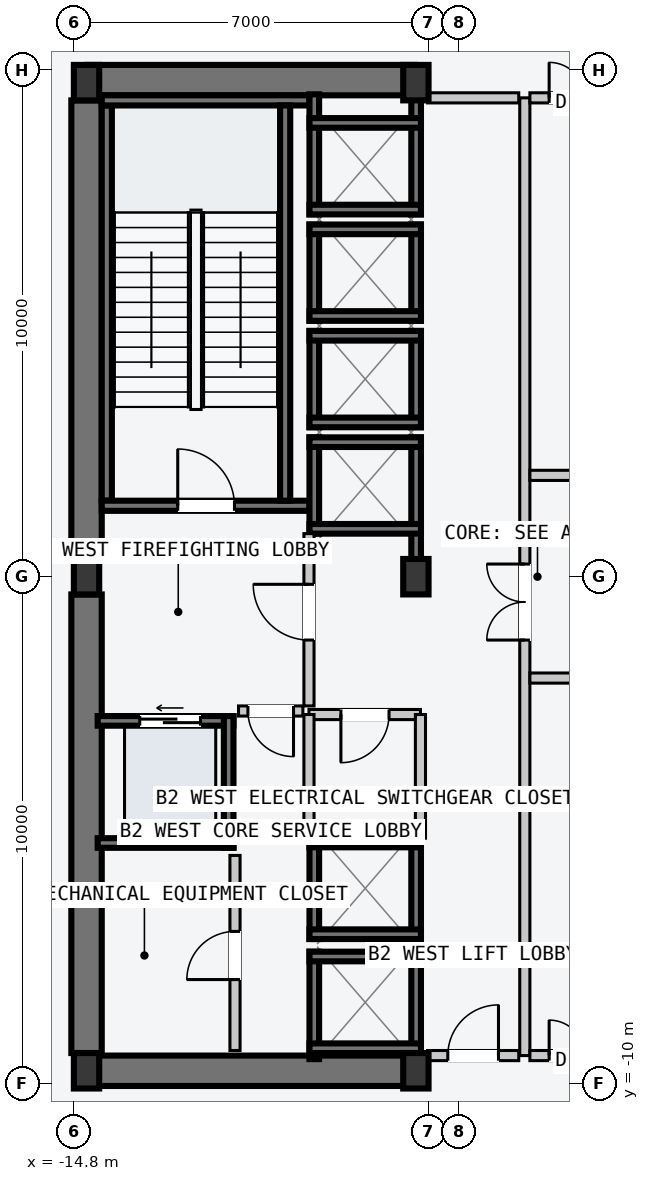
"""IFC4 building model, lengths in metres.
Left out: names, types, materials, properties, quantities, classifications, styles, units other than length and angle.
Written with IfcOpenShell. Run it as: python <this file> out.ifc"""

import sys

from ifc_helpers import new_model, si_unit, direction, frame, frame_2d, origin, origin_2d, place, context, subcontext, project, spatial, rectangle, i_section, extrude, element, fill, save


model = new_model("IFC4")
c1 = context("Model", 3, precision=1e-05, world=origin(), true_north=direction((0.0, 1.0)))
c2 = subcontext(c1, "Body", "Model", "MODEL_VIEW")
j1 = project(units=[si_unit("LENGTHUNIT", "METRE"), si_unit("PLANEANGLEUNIT", "RADIAN")], contexts=[c1])
p1 = place(None, origin())
s1 = spatial("IfcSite", under=j1, at=p1, CompositionType="ELEMENT")
p2 = place(p1, origin())
s2 = spatial("IfcBuilding", under=s1, at=p2, CompositionType="ELEMENT")
p3 = place(p2, frame((0.0, 0.0, -9.6)))
s3 = spatial("IfcBuildingStorey", under=s2, at=p3, CompositionType="ELEMENT", Elevation=-9.6)
for number, where, z_axis, x_axis in (
    (1, (-14.53, -9.75, 0.0), (0.0, 0.0, 1.0), (1.0, 0.0, 0.0)),
    (2, (-14.53, 9.8, 0.0), (0.0, 0.0, 1.0), (1.0, 0.0, 0.0)),
):
    element("IfcWall", number, at=place(p3, frame(where, z_axis=z_axis, x_axis=x_axis)), inside=s3, PredefinedType="SHEAR", context=c2, shape_type="SweptSolid", body=[
        extrude(rectangle(XDim=6.46, YDim=0.6, at=frame_2d((3.23, 0.0))), origin(), (0.0, 0.0, 1.0), 4.58),
    ])
for number, where, z_axis, x_axis in (
    (3, (-14.55, -9.4, 0.0), (0.0, 0.0, 1.0), (0.0, 1.0, 0.0)),
    (4, (-14.55, 0.35, 0.0), (0.0, 0.0, 1.0), (0.0, 1.0, 0.0)),
):
    element("IfcWall", number, at=place(p3, frame(where, z_axis=z_axis, x_axis=x_axis)), inside=s3, PredefinedType="SHEAR", context=c2, shape_type="SweptSolid", body=[
        extrude(rectangle(XDim=9.05, YDim=0.6, at=frame_2d((4.525, 0.0))), origin(), (0.0, 0.0, 1.0), 4.58),
    ])
p4 = place(p3, frame((-14.15, 1.5, 0.0), z_axis=(0.0, 0.0, 1.0), x_axis=(0.0, 1.0, 0.0)))
e5 = element("IfcWall", 5, at=p4, inside=s3, PredefinedType="SOLIDWALL", context=c2, shape_type="SweptSolid", body=[
    extrude(rectangle(XDim=7.8, YDim=0.2, at=frame_2d((3.9, 0.0))), origin(), (0.0, 0.0, 1.0), 4.58),
])
p5 = place(p3, frame((-14.25, 1.4, 0.0), z_axis=(0.0, 0.0, 1.0), x_axis=(1.0, 0.0, 0.0)))
e6 = element("IfcWall", 6, at=p5, inside=s3, PredefinedType="SOLIDWALL", context=c2, shape_type="SweptSolid", body=[
    extrude(rectangle(XDim=4.1, YDim=0.2, at=frame_2d((2.05, 0.0))), origin(), (0.0, 0.0, 1.0), 4.58),
])
p6 = place(p5, frame((1.5, 0.0, 0.0)))
e7 = element("IfcOpeningElement", 7, at=p6, cuts=e6, PredefinedType="OPENING", context=c2, shape_type="SweptSolid", body=[
    extrude(rectangle(XDim=1.12, YDim=2.18, at=frame_2d((0.56, 1.09))), frame((0.0, 0.11, 0.0), z_axis=(0.0, -1.0, 0.0), x_axis=(1.0, 0.0, 0.0)), (0.0, 0.0, 1.0), 0.22),
])
p7 = place(p3, frame((-14.25, 9.4, 0.0), z_axis=(0.0, 0.0, 1.0), x_axis=(1.0, 0.0, 0.0)))
e8 = element("IfcWall", 8, at=p7, inside=s3, PredefinedType="SOLIDWALL", context=c2, shape_type="SweptSolid", body=[
    extrude(rectangle(XDim=4.1, YDim=0.2, at=frame_2d((2.05, 0.0))), origin(), (0.0, 0.0, 1.0), 4.58),
])
p8 = place(p3, frame((-10.63, 1.5, 0.0), z_axis=(0.0, 0.0, 1.0), x_axis=(0.0, 1.0, 0.0)))
e9 = element("IfcWall", 9, at=p8, inside=s3, PredefinedType="SOLIDWALL", context=c2, shape_type="SweptSolid", body=[
    extrude(rectangle(XDim=7.8, YDim=0.2, at=frame_2d((3.9, 0.0))), origin(), (0.0, 0.0, 1.0), 4.58),
])
for number, where, z_axis, x_axis in (
    (10, (-14.55, -9.75, 0.0), (0.0, 0.0, 1.0), (1.0, 0.0, 0.0)),
    (11, (-14.55, 0.0, 0.0), (0.0, 0.0, 1.0), (1.0, 0.0, 0.0)),
    (12, (-14.55, 9.75, 0.0), (0.0, 0.0, 1.0), (1.0, 0.0, 0.0)),
    (13, (-8.05, -9.75, 0.0), (0.0, 0.0, 1.0), (1.0, 0.0, 0.0)),
    (14, (-8.05, 0.0, 0.0), (0.0, 0.0, 1.0), (1.0, 0.0, 0.0)),
    (15, (-8.05, 9.75, 0.0), (0.0, 0.0, 1.0), (1.0, 0.0, 0.0)),
):
    element("IfcColumn", number, at=place(p3, frame(where, z_axis=z_axis, x_axis=x_axis)), inside=s3, PredefinedType="COLUMN", context=c2, shape_type="SweptSolid", body=[
        extrude(i_section(OverallWidth=0.5, OverallDepth=0.7, WebThickness=0.028, FlangeThickness=0.045, at=origin_2d()), origin(), (0.0, 0.0, 1.0), 4.8),
    ])
p9 = place(p3, frame((-8.045, 0.21, 0.0), z_axis=(0.0, 0.0, 1.0), x_axis=(0.0, 1.0, 0.0)))
e16 = element("IfcWall", 16, at=p9, inside=s3, PredefinedType="SOLIDWALL", context=c2, shape_type="SweptSolid", body=[
    extrude(rectangle(XDim=2.54, YDim=0.19, at=frame_2d((1.27, 0.0))), origin(), (0.0, 0.0, 1.0), 4.58),
])
p10 = place(p3, frame((-10.055, 0.85, 0.0), z_axis=(0.0, 0.0, 1.0), x_axis=(0.0, 1.0, 0.0)))
e17 = element("IfcWall", 17, at=p10, inside=s3, PredefinedType="SOLIDWALL", context=c2, shape_type="SweptSolid", body=[
    extrude(rectangle(XDim=1.9, YDim=0.19, at=frame_2d((0.95, 0.0))), origin(), (0.0, 0.0, 1.0), 4.58),
])
for number, where, z_axis, x_axis in (
    (18, (-10.15, 2.655, 0.0), (0.0, 0.0, 1.0), (1.0, 0.0, 0.0)),
    (19, (-10.15, 0.945, 0.0), (0.0, 0.0, 1.0), (1.0, 0.0, 0.0)),
):
    element("IfcWall", number, at=place(p3, frame(where, z_axis=z_axis, x_axis=x_axis)), inside=s3, PredefinedType="SOLIDWALL", context=c2, shape_type="SweptSolid", body=[
        extrude(rectangle(XDim=2.2, YDim=0.19, at=frame_2d((1.1, 0.0))), origin(), (0.0, 0.0, 1.0), 4.58),
    ])
for number, where, z_axis, x_axis in (
    (20, (-8.045, 2.95, 0.0), (0.0, 0.0, 1.0), (0.0, 1.0, 0.0)),
    (21, (-10.055, 2.95, 0.0), (0.0, 0.0, 1.0), (0.0, 1.0, 0.0)),
):
    element("IfcWall", number, at=place(p3, frame(where, z_axis=z_axis, x_axis=x_axis)), inside=s3, PredefinedType="SOLIDWALL", context=c2, shape_type="SweptSolid", body=[
        extrude(rectangle(XDim=1.9, YDim=0.19, at=frame_2d((0.95, 0.0))), origin(), (0.0, 0.0, 1.0), 4.58),
    ])
for number, where, z_axis, x_axis in (
    (22, (-10.15, 4.755, 0.0), (0.0, 0.0, 1.0), (1.0, 0.0, 0.0)),
    (23, (-10.15, 3.045, 0.0), (0.0, 0.0, 1.0), (1.0, 0.0, 0.0)),
):
    element("IfcWall", number, at=place(p3, frame(where, z_axis=z_axis, x_axis=x_axis)), inside=s3, PredefinedType="SOLIDWALL", context=c2, shape_type="SweptSolid", body=[
        extrude(rectangle(XDim=2.2, YDim=0.19, at=frame_2d((1.1, 0.0))), origin(), (0.0, 0.0, 1.0), 4.58),
    ])
for number, where, z_axis, x_axis in (
    (24, (-8.045, 5.05, 0.0), (0.0, 0.0, 1.0), (0.0, 1.0, 0.0)),
    (25, (-10.055, 5.05, 0.0), (0.0, 0.0, 1.0), (0.0, 1.0, 0.0)),
):
    element("IfcWall", number, at=place(p3, frame(where, z_axis=z_axis, x_axis=x_axis)), inside=s3, PredefinedType="SOLIDWALL", context=c2, shape_type="SweptSolid", body=[
        extrude(rectangle(XDim=1.9, YDim=0.19, at=frame_2d((0.95, 0.0))), origin(), (0.0, 0.0, 1.0), 4.58),
    ])
for number, where, z_axis, x_axis in (
    (26, (-10.15, 6.855, 0.0), (0.0, 0.0, 1.0), (1.0, 0.0, 0.0)),
    (27, (-10.15, 5.145, 0.0), (0.0, 0.0, 1.0), (1.0, 0.0, 0.0)),
):
    element("IfcWall", number, at=place(p3, frame(where, z_axis=z_axis, x_axis=x_axis)), inside=s3, PredefinedType="SOLIDWALL", context=c2, shape_type="SweptSolid", body=[
        extrude(rectangle(XDim=2.2, YDim=0.19, at=frame_2d((1.1, 0.0))), origin(), (0.0, 0.0, 1.0), 4.58),
    ])
for number, where, z_axis, x_axis in (
    (28, (-8.045, 7.15, 0.0), (0.0, 0.0, 1.0), (0.0, 1.0, 0.0)),
    (29, (-10.055, 7.15, 0.0), (0.0, 0.0, 1.0), (0.0, 1.0, 0.0)),
):
    element("IfcWall", number, at=place(p3, frame(where, z_axis=z_axis, x_axis=x_axis)), inside=s3, PredefinedType="SOLIDWALL", context=c2, shape_type="SweptSolid", body=[
        extrude(rectangle(XDim=2.37, YDim=0.19, at=frame_2d((1.185, 0.0))), origin(), (0.0, 0.0, 1.0), 4.58),
    ])
for number, where, z_axis, x_axis in (
    (30, (-10.15, 8.955, 0.0), (0.0, 0.0, 1.0), (1.0, 0.0, 0.0)),
    (31, (-10.15, 7.245, 0.0), (0.0, 0.0, 1.0), (1.0, 0.0, 0.0)),
):
    element("IfcWall", number, at=place(p3, frame(where, z_axis=z_axis, x_axis=x_axis)), inside=s3, PredefinedType="SOLIDWALL", context=c2, shape_type="SweptSolid", body=[
        extrude(rectangle(XDim=2.2, YDim=0.19, at=frame_2d((1.1, 0.0))), origin(), (0.0, 0.0, 1.0), 4.58),
    ])
for number, where, z_axis, x_axis in (
    (32, (-8.045, -9.52, 0.0), (0.0, 0.0, 1.0), (0.0, 1.0, 0.0)),
    (33, (-10.055, -9.52, 0.0), (0.0, 0.0, 1.0), (0.0, 1.0, 0.0)),
):
    element("IfcWall", number, at=place(p3, frame(where, z_axis=z_axis, x_axis=x_axis)), inside=s3, PredefinedType="SOLIDWALL", context=c2, shape_type="SweptSolid", body=[
        extrude(rectangle(XDim=2.12, YDim=0.19, at=frame_2d((1.06, 0.0))), origin(), (0.0, 0.0, 1.0), 4.58),
    ])
for number, where, z_axis, x_axis in (
    (34, (-10.15, -7.495, 0.0), (0.0, 0.0, 1.0), (1.0, 0.0, 0.0)),
    (35, (-10.15, -9.305, 0.0), (0.0, 0.0, 1.0), (1.0, 0.0, 0.0)),
):
    element("IfcWall", number, at=place(p3, frame(where, z_axis=z_axis, x_axis=x_axis)), inside=s3, PredefinedType="SOLIDWALL", context=c2, shape_type="SweptSolid", body=[
        extrude(rectangle(XDim=2.2, YDim=0.19, at=frame_2d((1.1, 0.0))), origin(), (0.0, 0.0, 1.0), 4.58),
    ])
for number, where, z_axis, x_axis in (
    (36, (-8.045, -7.15, 0.0), (0.0, 0.0, 1.0), (0.0, 1.0, 0.0)),
    (37, (-10.055, -7.15, 0.0), (0.0, 0.0, 1.0), (0.0, 1.0, 0.0)),
):
    element("IfcWall", number, at=place(p3, frame(where, z_axis=z_axis, x_axis=x_axis)), inside=s3, PredefinedType="SOLIDWALL", context=c2, shape_type="SweptSolid", body=[
        extrude(rectangle(XDim=2.0, YDim=0.19, at=frame_2d((1.0, 0.0))), origin(), (0.0, 0.0, 1.0), 4.58),
    ])
for number, where, z_axis, x_axis in (
    (38, (-10.15, -5.245, 0.0), (0.0, 0.0, 1.0), (1.0, 0.0, 0.0)),
    (39, (-10.15, -7.055, 0.0), (0.0, 0.0, 1.0), (1.0, 0.0, 0.0)),
):
    element("IfcWall", number, at=place(p3, frame(where, z_axis=z_axis, x_axis=x_axis)), inside=s3, PredefinedType="SOLIDWALL", context=c2, shape_type="SweptSolid", body=[
        extrude(rectangle(XDim=2.2, YDim=0.19, at=frame_2d((1.1, 0.0))), origin(), (0.0, 0.0, 1.0), 4.58),
    ])
p11 = place(p3, frame((-14.33, -2.845, 0.0), z_axis=(0.0, 0.0, 1.0), x_axis=(1.0, 0.0, 0.0)))
e40 = element("IfcWall", 40, at=p11, inside=s3, PredefinedType="SOLIDWALL", context=c2, shape_type="SweptSolid", body=[
    extrude(rectangle(XDim=2.68, YDim=0.19, at=frame_2d((1.34, 0.0))), origin(), (0.0, 0.0, 1.0), 4.58),
])
p12 = place(p11, frame((0.83, 0.0, 0.0)))
e41 = element("IfcOpeningElement", 41, at=p12, cuts=e40, PredefinedType="OPENING", context=c2, shape_type="SweptSolid", body=[
    extrude(rectangle(XDim=1.2, YDim=2.2, at=frame_2d((0.6, 1.1))), frame((0.0, 0.105, 0.0), z_axis=(0.0, -1.0, 0.0), x_axis=(1.0, 0.0, 0.0)), (0.0, 0.0, 1.0), 0.21),
])
p13 = place(p3, frame((-14.33, -5.255, 0.0), z_axis=(0.0, 0.0, 1.0), x_axis=(1.0, 0.0, 0.0)))
e42 = element("IfcWall", 42, at=p13, inside=s3, PredefinedType="SOLIDWALL", context=c2, shape_type="SweptSolid", body=[
    extrude(rectangle(XDim=2.68, YDim=0.19, at=frame_2d((1.34, 0.0))), origin(), (0.0, 0.0, 1.0), 4.58),
])
p14 = place(p3, frame((-11.745, -5.35, 0.0), z_axis=(0.0, 0.0, 1.0), x_axis=(0.0, 1.0, 0.0)))
e43 = element("IfcWall", 43, at=p14, inside=s3, PredefinedType="SOLIDWALL", context=c2, shape_type="SweptSolid", body=[
    extrude(rectangle(XDim=2.6, YDim=0.19, at=frame_2d((1.3, 0.0))), origin(), (0.0, 0.0, 1.0), 4.58),
])
p15 = place(p3, frame((-5.9, -9.45, 0.0), z_axis=(0.0, 0.0, 1.0), x_axis=(0.0, 1.0, 0.0)))
e44 = element("IfcWall", 44, at=p15, inside=s3, PredefinedType="PARTITIONING", context=c2, shape_type="SweptSolid", body=[
    extrude(rectangle(XDim=18.9, YDim=0.2, at=frame_2d((9.45, 0.0))), origin(), (0.0, 0.0, 1.0), 4.58),
])
p16 = place(p15, frame((8.2, 0.0, 0.0)))
e45 = element("IfcOpeningElement", 45, at=p16, cuts=e44, PredefinedType="OPENING", context=c2, shape_type="SweptSolid", body=[
    extrude(rectangle(XDim=1.5, YDim=2.2, at=frame_2d((0.75, 1.1))), frame((0.0, 0.11, 0.0), z_axis=(0.0, -1.0, 0.0), x_axis=(1.0, 0.0, 0.0)), (0.0, 0.0, 1.0), 0.22),
])
p17 = place(p3, frame((-6.02, 9.45, 0.0), z_axis=(0.0, 0.0, 1.0), x_axis=(-1.0, 0.0, 0.0)))
e46 = element("IfcWall", 46, at=p17, inside=s3, PredefinedType="PARTITIONING", context=c2, shape_type="SweptSolid", body=[
    extrude(rectangle(XDim=1.8, YDim=0.2, at=frame_2d((0.9, 0.0))), origin(), (0.0, 0.0, 1.0), 4.58),
])
p18 = place(p3, frame((-10.16, -2.55, 0.0), z_axis=(0.0, 0.0, 1.0), x_axis=(0.0, 1.0, 0.0)))
e47 = element("IfcWall", 47, at=p18, inside=s3, PredefinedType="PARTITIONING", context=c2, shape_type="SweptSolid", body=[
    extrude(rectangle(XDim=3.4, YDim=0.2, at=frame_2d((1.7, 0.0))), origin(), (0.0, 0.0, 1.0), 4.58),
])
p19 = place(p18, frame((1.3, 0.0, 0.0)))
e48 = element("IfcOpeningElement", 48, at=p19, cuts=e47, PredefinedType="OPENING", context=c2, shape_type="SweptSolid", body=[
    extrude(rectangle(XDim=1.1, YDim=2.15, at=frame_2d((0.55, 1.075))), frame((0.0, 0.11, 0.0), z_axis=(0.0, -1.0, 0.0), x_axis=(1.0, 0.0, 0.0)), (0.0, 0.0, 1.0), 0.22),
])
p20 = place(p3, frame((-10.28, -2.65, 0.0), z_axis=(0.0, 0.0, 1.0), x_axis=(-1.0, 0.0, 0.0)))
e49 = element("IfcWall", 49, at=p20, inside=s3, PredefinedType="PARTITIONING", context=c2, shape_type="SweptSolid", body=[
    extrude(rectangle(XDim=1.27, YDim=0.2, at=frame_2d((0.635, 0.0))), origin(), (0.0, 0.0, 1.0), 4.58),
])
p21 = place(p20, frame((0.185, 0.0, 0.0)))
e50 = element("IfcOpeningElement", 50, at=p21, cuts=e49, PredefinedType="OPENING", context=c2, shape_type="SweptSolid", body=[
    extrude(rectangle(XDim=0.9, YDim=2.15, at=frame_2d((0.45, 1.075))), frame((0.0, 0.11, 0.0), z_axis=(0.0, -1.0, 0.0), x_axis=(1.0, 0.0, 0.0)), (0.0, 0.0, 1.0), 0.22),
])
p22 = place(p3, frame((-7.96, -2.72, 0.0), z_axis=(0.0, 0.0, 1.0), x_axis=(-1.0, 0.0, 0.0)))
e51 = element("IfcWall", 51, at=p22, inside=s3, PredefinedType="PARTITIONING", context=c2, shape_type="SweptSolid", body=[
    extrude(rectangle(XDim=2.2, YDim=0.2, at=frame_2d((1.1, 0.0))), origin(), (0.0, 0.0, 1.0), 4.58),
])
p23 = place(p22, frame((0.62, 0.0, 0.0)))
e52 = element("IfcOpeningElement", 52, at=p23, cuts=e51, PredefinedType="OPENING", context=c2, shape_type="SweptSolid", body=[
    extrude(rectangle(XDim=0.95, YDim=2.1, at=frame_2d((0.475, 1.05))), frame((0.0, 0.11, 0.0), z_axis=(0.0, -1.0, 0.0), x_axis=(1.0, 0.0, 0.0)), (0.0, 0.0, 1.0), 0.22),
])
for number, where, z_axis, x_axis in (
    (53, (-7.96, -5.16, 0.0), (0.0, 0.0, 1.0), (0.0, 1.0, 0.0)),
    (54, (-10.16, -5.16, 0.0), (0.0, 0.0, 1.0), (0.0, 1.0, 0.0)),
):
    element("IfcWall", number, at=place(p3, frame(where, z_axis=z_axis, x_axis=x_axis)), inside=s3, PredefinedType="PARTITIONING", context=c2, shape_type="SweptSolid", body=[
        extrude(rectangle(XDim=2.44, YDim=0.2, at=frame_2d((1.22, 0.0))), origin(), (0.0, 0.0, 1.0), 4.58),
    ])
p24 = place(p3, frame((-11.62, -9.35, 0.0), z_axis=(0.0, 0.0, 1.0), x_axis=(0.0, 1.0, 0.0)))
e55 = element("IfcWall", 55, at=p24, inside=s3, PredefinedType="PARTITIONING", context=c2, shape_type="SweptSolid", body=[
    extrude(rectangle(XDim=3.85, YDim=0.2, at=frame_2d((1.925, 0.0))), origin(), (0.0, 0.0, 1.0), 4.58),
])
p25 = place(p24, frame((1.4, 0.0, 0.0)))
e56 = element("IfcOpeningElement", 56, at=p25, cuts=e55, PredefinedType="OPENING", context=c2, shape_type="SweptSolid", body=[
    extrude(rectangle(XDim=0.95, YDim=2.1, at=frame_2d((0.475, 1.05))), frame((0.0, 0.11, 0.0), z_axis=(0.0, -1.0, 0.0), x_axis=(1.0, 0.0, 0.0)), (0.0, 0.0, 1.0), 0.22),
])
p26 = place(p3, frame((-7.82, -9.45, 0.0), z_axis=(0.0, 0.0, 1.0), x_axis=(1.0, 0.0, 0.0)))
e57 = element("IfcWall", 57, at=p26, inside=s3, PredefinedType="PARTITIONING", context=c2, shape_type="SweptSolid", body=[
    extrude(rectangle(XDim=1.8, YDim=0.2, at=frame_2d((0.9, 0.0))), origin(), (0.0, 0.0, 1.0), 4.58),
])
p27 = place(p26, frame((0.4, 0.0, 0.0)))
e58 = element("IfcOpeningElement", 58, at=p27, cuts=e57, PredefinedType="OPENING", context=c2, shape_type="SweptSolid", body=[
    extrude(rectangle(XDim=1.0, YDim=2.15, at=frame_2d((0.5, 1.075))), frame((0.0, 0.11, 0.0), z_axis=(0.0, -1.0, 0.0), x_axis=(1.0, 0.0, 0.0)), (0.0, 0.0, 1.0), 0.22),
])
p28 = place(p3, frame((-5.8, -9.45, 0.0), z_axis=(0.0, 0.0, 1.0), x_axis=(1.0, 0.0, 0.0)))
e59 = element("IfcWall", 59, at=p28, inside=s3, PredefinedType="PARTITIONING", context=c2, shape_type="SweptSolid", body=[
    extrude(rectangle(XDim=11.6, YDim=0.2, at=frame_2d((5.8, 0.0))), origin(), (0.0, 0.0, 1.0), 4.58),
])
p29 = place(p28, frame((0.38, 0.0, 0.0)))
e60 = element("IfcOpeningElement", 60, at=p29, cuts=e59, PredefinedType="OPENING", context=c2, shape_type="SweptSolid", body=[
    extrude(rectangle(XDim=1.4, YDim=2.25, at=frame_2d((0.7, 1.125))), frame((0.0, 0.11, 0.0), z_axis=(0.0, -1.0, 0.0), x_axis=(1.0, 0.0, 0.0)), (0.0, 0.0, 1.0), 0.22),
])
for number, where, z_axis, x_axis in (
    (61, (-5.8, -2.0, 0.0), (0.0, 0.0, 1.0), (1.0, 0.0, 0.0)),
    (62, (-5.8, 2.0, 0.0), (0.0, 0.0, 1.0), (1.0, 0.0, 0.0)),
):
    element("IfcWall", number, at=place(p3, frame(where, z_axis=z_axis, x_axis=x_axis)), inside=s3, PredefinedType="PARTITIONING", context=c2, shape_type="SweptSolid", body=[
        extrude(rectangle(XDim=11.6, YDim=0.2, at=frame_2d((5.8, 0.0))), origin(), (0.0, 0.0, 1.0), 4.58),
    ])
p30 = place(p3, frame((-5.8, 9.45, 0.0), z_axis=(0.0, 0.0, 1.0), x_axis=(1.0, 0.0, 0.0)))
e63 = element("IfcWall", 63, at=p30, inside=s3, PredefinedType="PARTITIONING", context=c2, shape_type="SweptSolid", body=[
    extrude(rectangle(XDim=11.6, YDim=0.2, at=frame_2d((5.8, 0.0))), origin(), (0.0, 0.0, 1.0), 4.58),
])
p31 = place(p30, frame((0.38, 0.0, 0.0)))
e64 = element("IfcOpeningElement", 64, at=p31, cuts=e63, PredefinedType="OPENING", context=c2, shape_type="SweptSolid", body=[
    extrude(rectangle(XDim=1.4, YDim=2.25, at=frame_2d((0.7, 1.125))), frame((0.0, 0.11, 0.0), z_axis=(0.0, -1.0, 0.0), x_axis=(1.0, 0.0, 0.0)), (0.0, 0.0, 1.0), 0.22),
])
p32 = place(p6, origin())
e65 = element("IfcDoor", 65, at=p32, inside=s3, OperationType="SINGLE_SWING_LEFT", PredefinedType="DOOR", context=c2, shape_type="SweptSolid", body=[
    extrude(rectangle(XDim=1.12, YDim=2.18, at=frame_2d((0.56, 1.09))), frame((0.0, 0.025, 0.0), z_axis=(0.0, -1.0, 0.0), x_axis=(1.0, 0.0, 0.0)), (0.0, 0.0, 1.0), 0.05),
])
fill(e7, e65)
p33 = place(p12, origin())
e66 = element("IfcDoor", 66, at=p33, inside=s3, OperationType="SLIDING_TO_LEFT", PredefinedType="DOOR", context=c2, shape_type="SweptSolid", body=[
    extrude(rectangle(XDim=1.2, YDim=2.2, at=frame_2d((0.6, 1.1))), frame((0.0, 0.025, 0.0), z_axis=(0.0, -1.0, 0.0), x_axis=(1.0, 0.0, 0.0)), (0.0, 0.0, 1.0), 0.05),
])
fill(e41, e66)
p34 = place(p16, origin())
e67 = element("IfcDoor", 67, at=p34, inside=s3, OperationType="DOUBLE_DOOR_SINGLE_SWING", PredefinedType="DOOR", context=c2, shape_type="SweptSolid", body=[
    extrude(rectangle(XDim=1.5, YDim=2.2, at=frame_2d((0.75, 1.1))), frame((0.0, 0.025, 0.0), z_axis=(0.0, -1.0, 0.0), x_axis=(1.0, 0.0, 0.0)), (0.0, 0.0, 1.0), 0.05),
])
fill(e45, e67)
p35 = place(p19, origin())
e68 = element("IfcDoor", 68, at=p35, inside=s3, OperationType="SINGLE_SWING_RIGHT", PredefinedType="DOOR", context=c2, shape_type="SweptSolid", body=[
    extrude(rectangle(XDim=1.1, YDim=2.15, at=frame_2d((0.55, 1.075))), frame((0.0, 0.025, 0.0), z_axis=(0.0, -1.0, 0.0), x_axis=(1.0, 0.0, 0.0)), (0.0, 0.0, 1.0), 0.05),
])
fill(e48, e68)
p36 = place(p21, origin())
e69 = element("IfcDoor", 69, at=p36, inside=s3, OperationType="SINGLE_SWING_LEFT", PredefinedType="DOOR", context=c2, shape_type="SweptSolid", body=[
    extrude(rectangle(XDim=0.9, YDim=2.15, at=frame_2d((0.45, 1.075))), frame((0.0, 0.025, 0.0), z_axis=(0.0, -1.0, 0.0), x_axis=(1.0, 0.0, 0.0)), (0.0, 0.0, 1.0), 0.05),
])
fill(e50, e69)
p37 = place(p23, origin())
e70 = element("IfcDoor", 70, at=p37, inside=s3, OperationType="SINGLE_SWING_RIGHT", PredefinedType="DOOR", context=c2, shape_type="SweptSolid", body=[
    extrude(rectangle(XDim=0.95, YDim=2.1, at=frame_2d((0.475, 1.05))), frame((0.0, 0.025, 0.0), z_axis=(0.0, -1.0, 0.0), x_axis=(1.0, 0.0, 0.0)), (0.0, 0.0, 1.0), 0.05),
])
fill(e52, e70)
p38 = place(p25, origin())
e71 = element("IfcDoor", 71, at=p38, inside=s3, OperationType="SINGLE_SWING_LEFT", PredefinedType="DOOR", context=c2, shape_type="SweptSolid", body=[
    extrude(rectangle(XDim=0.95, YDim=2.1, at=frame_2d((0.475, 1.05))), frame((0.0, 0.025, 0.0), z_axis=(0.0, -1.0, 0.0), x_axis=(1.0, 0.0, 0.0)), (0.0, 0.0, 1.0), 0.05),
])
fill(e56, e71)
p39 = place(p27, origin())
e72 = element("IfcDoor", 72, at=p39, inside=s3, OperationType="SINGLE_SWING_RIGHT", PredefinedType="DOOR", context=c2, shape_type="SweptSolid", body=[
    extrude(rectangle(XDim=1.0, YDim=2.15, at=frame_2d((0.5, 1.075))), frame((0.0, 0.025, 0.0), z_axis=(0.0, -1.0, 0.0), x_axis=(1.0, 0.0, 0.0)), (0.0, 0.0, 1.0), 0.05),
])
fill(e58, e72)
p40 = place(p29, origin())
e73 = element("IfcDoor", 73, at=p40, inside=s3, OperationType="DOUBLE_DOOR_SINGLE_SWING", PredefinedType="DOOR", context=c2, shape_type="SweptSolid", body=[
    extrude(rectangle(XDim=1.4, YDim=2.25, at=frame_2d((0.7, 1.125))), frame((0.0, 0.025, 0.0), z_axis=(0.0, -1.0, 0.0), x_axis=(1.0, 0.0, 0.0)), (0.0, 0.0, 1.0), 0.05),
])
fill(e60, e73)
p41 = place(p31, origin())
e74 = element("IfcDoor", 74, at=p41, inside=s3, OperationType="DOUBLE_DOOR_SINGLE_SWING", PredefinedType="DOOR", context=c2, shape_type="SweptSolid", body=[
    extrude(rectangle(XDim=1.4, YDim=2.25, at=frame_2d((0.7, 1.125))), frame((0.0, 0.025, 0.0), z_axis=(0.0, -1.0, 0.0), x_axis=(1.0, 0.0, 0.0)), (0.0, 0.0, 1.0), 0.05),
])
fill(e64, e74)
save(model, sys.argv[1])
